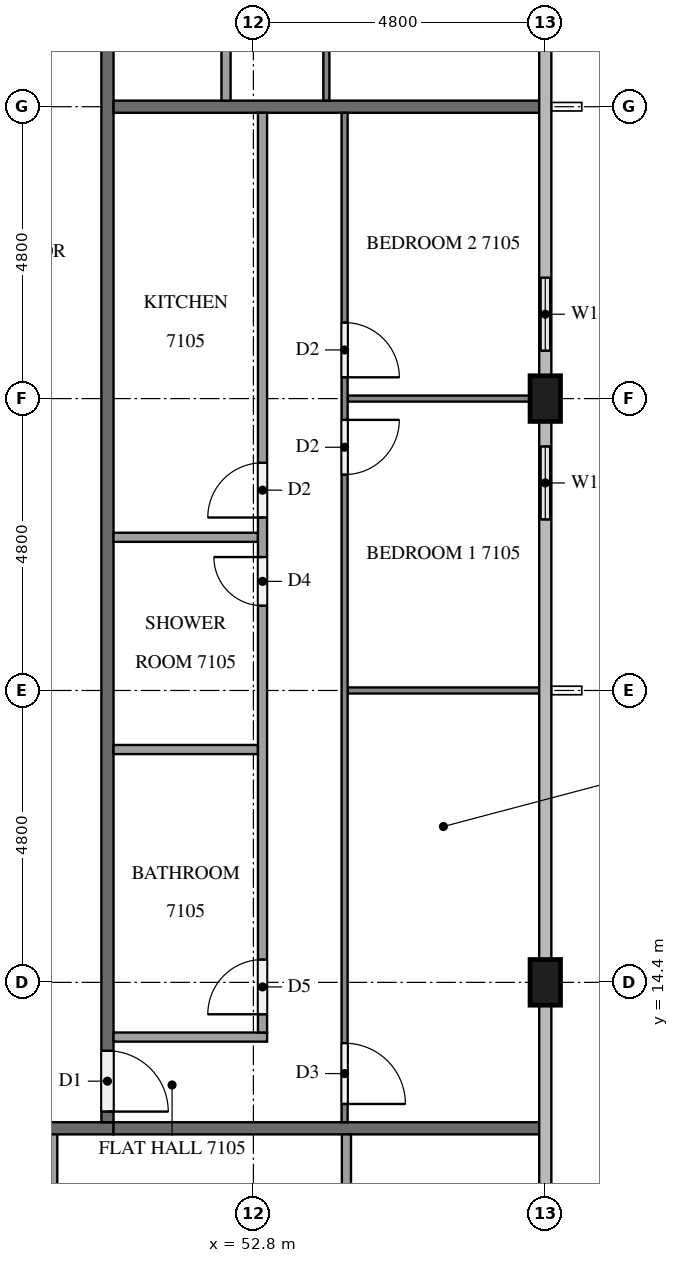
"""IFC4 building model, lengths in metres.
Left out: names, types, materials, properties, quantities, classifications, styles, units other than length and angle.
Written with IfcOpenShell. Run it as: python <this file> out.ifc"""

import sys

from ifc_helpers import new_model, si_unit, direction, frame, frame_2d, origin, origin_2d, place, context, subcontext, project, spatial, rectangle, extrude, element, fill, save


model = new_model("IFC4")
c1 = context("Model", 3, precision=1e-05, world=origin(), true_north=direction((0.0, 1.0)))
c2 = subcontext(c1, "Body", "Model", "MODEL_VIEW")
j1 = project(units=[si_unit("LENGTHUNIT", "METRE"), si_unit("PLANEANGLEUNIT", "RADIAN")], contexts=[c1])
p1 = place(None, origin())
s1 = spatial("IfcSite", under=j1, at=p1, CompositionType="ELEMENT")
p2 = place(p1, origin())
s2 = spatial("IfcBuilding", under=s1, at=p2, CompositionType="ELEMENT")
p3 = place(p2, frame((0.0, 0.0, 272.1)))
s3 = spatial("IfcBuildingStorey", under=s2, at=p3, CompositionType="ELEMENT", Elevation=272.1)
for number, where, z_axis, x_axis in (
    (1, (57.6, 14.4, 0.0), (0.0, 0.0, 1.0), (0.0, 1.0, 0.0)),
    (2, (57.6, 24.0, 0.0), (0.0, 0.0, 1.0), (0.0, 1.0, 0.0)),
):
    element("IfcColumn", number, at=place(p3, frame(where, z_axis=z_axis, x_axis=x_axis)), inside=s3, PredefinedType="COLUMN", context=c2, shape_type="SweptSolid", body=[
        extrude(rectangle(XDim=0.75, YDim=0.5, at=origin_2d()), origin(), (0.0, 0.0, 1.0), 3.2),
    ])
p4 = place(p3, frame((57.6, 21.6, 0.0), z_axis=(0.0, 0.0, 1.0), x_axis=(0.0, 1.0, 0.0)))
e3 = element("IfcWall", 3, at=p4, inside=s3, PredefinedType="SOLIDWALL", context=c2, shape_type="SweptSolid", body=[
    extrude(rectangle(XDim=2.025, YDim=0.15, at=frame_2d((1.012, 0.0))), origin(), (0.0, 0.0, 1.0), 3.2),
])
p5 = place(p4, frame((0.413, 0.0, 0.9)))
e4 = element("IfcOpeningElement", 4, at=p5, cuts=e3, PredefinedType="OPENING", context=c2, shape_type="SweptSolid", body=[
    extrude(rectangle(XDim=1.2, YDim=1.4, at=frame_2d((0.6, 0.7))), frame((0.0, 0.085, 0.0), z_axis=(0.0, -1.0, 0.0), x_axis=(1.0, 0.0, 0.0)), (0.0, 0.0, 1.0), 0.17),
])
p6 = place(p3, frame((57.6, 24.375, 0.0), z_axis=(0.0, 0.0, 1.0), x_axis=(0.0, 1.0, 0.0)))
e5 = element("IfcWall", 5, at=p6, inside=s3, PredefinedType="SOLIDWALL", context=c2, shape_type="SweptSolid", body=[
    extrude(rectangle(XDim=2.025, YDim=0.15, at=frame_2d((1.012, 0.0))), origin(), (0.0, 0.0, 1.0), 3.2),
])
p7 = place(p6, frame((0.413, 0.0, 0.9)))
e6 = element("IfcOpeningElement", 6, at=p7, cuts=e5, PredefinedType="OPENING", context=c2, shape_type="SweptSolid", body=[
    extrude(rectangle(XDim=1.2, YDim=1.4, at=frame_2d((0.6, 0.7))), frame((0.0, 0.085, 0.0), z_axis=(0.0, -1.0, 0.0), x_axis=(1.0, 0.0, 0.0)), (0.0, 0.0, 1.0), 0.17),
])
p8 = place(p3, frame((50.5, 12.0, 0.0), z_axis=(0.0, 0.0, 1.0), x_axis=(-1.0, 0.0, 0.0)))
e7 = element("IfcWall", 7, at=p8, inside=s3, PredefinedType="PARTITIONING", context=c2, shape_type="SweptSolid", body=[
    extrude(rectangle(XDim=38.6, YDim=0.2, at=frame_2d((19.3, 0.0))), origin(), (0.0, 0.0, 1.0), 3.2),
])
p9 = place(p8, frame((31.525, 0.0, 0.0)))
e8 = element("IfcOpeningElement", 8, at=p9, cuts=e7, PredefinedType="OPENING", context=c2, shape_type="SweptSolid", body=[
    extrude(rectangle(XDim=1.1, YDim=2.1, at=frame_2d((0.55, 1.05))), frame((0.0, 0.11, 0.0), z_axis=(0.0, -1.0, 0.0), x_axis=(1.0, 0.0, 0.0)), (0.0, 0.0, 1.0), 0.22),
])
p10 = place(p8, frame((19.575, 0.0, 0.0)))
e9 = element("IfcOpeningElement", 9, at=p10, cuts=e7, PredefinedType="OPENING", context=c2, shape_type="SweptSolid", body=[
    extrude(rectangle(XDim=1.0, YDim=2.1, at=frame_2d((0.5, 1.05))), frame((0.0, 0.11, 0.0), z_axis=(0.0, -1.0, 0.0), x_axis=(1.0, 0.0, 0.0)), (0.0, 0.0, 1.0), 0.22),
])
p11 = place(p8, frame((18.025, 0.0, 0.0)))
e10 = element("IfcOpeningElement", 10, at=p11, cuts=e7, PredefinedType="OPENING", context=c2, shape_type="SweptSolid", body=[
    extrude(rectangle(XDim=1.0, YDim=2.1, at=frame_2d((0.5, 1.05))), frame((0.0, 0.11, 0.0), z_axis=(0.0, -1.0, 0.0), x_axis=(1.0, 0.0, 0.0)), (0.0, 0.0, 1.0), 0.22),
])
p12 = place(p8, frame((1.225, 0.0, 0.0)))
e11 = element("IfcOpeningElement", 11, at=p12, cuts=e7, PredefinedType="OPENING", context=c2, shape_type="SweptSolid", body=[
    extrude(rectangle(XDim=1.0, YDim=2.1, at=frame_2d((0.5, 1.05))), frame((0.0, 0.11, 0.0), z_axis=(0.0, -1.0, 0.0), x_axis=(1.0, 0.0, 0.0)), (0.0, 0.0, 1.0), 0.22),
])
p13 = place(p3, frame((50.4, 40.7, 0.0), z_axis=(0.0, 0.0, 1.0), x_axis=(0.0, -1.0, 0.0)))
e12 = element("IfcWall", 12, at=p13, inside=s3, PredefinedType="PARTITIONING", context=c2, shape_type="SweptSolid", body=[
    extrude(rectangle(XDim=28.6, YDim=0.2, at=frame_2d((14.3, 0.0))), origin(), (0.0, 0.0, 1.0), 3.2),
])
p14 = place(p13, frame((27.425, 0.0, 0.0)))
e13 = element("IfcOpeningElement", 13, at=p14, cuts=e12, PredefinedType="OPENING", context=c2, shape_type="SweptSolid", body=[
    extrude(rectangle(XDim=1.0, YDim=2.1, at=frame_2d((0.5, 1.05))), frame((0.0, 0.11, 0.0), z_axis=(0.0, -1.0, 0.0), x_axis=(1.0, 0.0, 0.0)), (0.0, 0.0, 1.0), 0.22),
])
p15 = place(p13, frame((0.175, 0.0, 0.0)))
e14 = element("IfcOpeningElement", 14, at=p15, cuts=e12, PredefinedType="OPENING", context=c2, shape_type="SweptSolid", body=[
    extrude(rectangle(XDim=1.0, YDim=2.1, at=frame_2d((0.5, 1.05))), frame((0.0, 0.11, 0.0), z_axis=(0.0, -1.0, 0.0), x_axis=(1.0, 0.0, 0.0)), (0.0, 0.0, 1.0), 0.22),
])
for number, where, z_axis, x_axis in (
    (15, (50.5, 12.0, 0.0), (0.0, 0.0, 1.0), (1.0, 0.0, 0.0)),
    (16, (50.5, 28.8, 0.0), (0.0, 0.0, 1.0), (1.0, 0.0, 0.0)),
):
    element("IfcWall", number, at=place(p3, frame(where, z_axis=z_axis, x_axis=x_axis)), inside=s3, PredefinedType="PARTITIONING", context=c2, shape_type="SweptSolid", body=[
        extrude(rectangle(XDim=7.0, YDim=0.2, at=frame_2d((3.5, 0.0))), origin(), (0.0, 0.0, 1.0), 3.2),
    ])
p16 = place(p3, frame((54.33, 11.9, 0.0), z_axis=(0.0, 0.0, 1.0), x_axis=(0.0, -1.0, 0.0)))
e17 = element("IfcWall", 17, at=p16, inside=s3, PredefinedType="PARTITIONING", context=c2, shape_type="SweptSolid", body=[
    extrude(rectangle(XDim=2.975, YDim=0.15, at=frame_2d((1.487, 0.0))), origin(), (0.0, 0.0, 1.0), 3.2),
])
p17 = place(p3, frame((49.5, 11.9, 0.0), z_axis=(0.0, 0.0, 1.0), x_axis=(0.0, -1.0, 0.0)))
e18 = element("IfcWall", 18, at=p17, inside=s3, PredefinedType="PARTITIONING", context=c2, shape_type="SweptSolid", body=[
    extrude(rectangle(XDim=3.125, YDim=0.15, at=frame_2d((1.562, 0.0))), origin(), (0.0, 0.0, 1.0), 3.2),
])
p18 = place(p3, frame((54.35, 19.2, 0.0), z_axis=(0.0, 0.0, 1.0), x_axis=(1.0, 0.0, 0.0)))
e19 = element("IfcWall", 19, at=p18, inside=s3, PredefinedType="PARTITIONING", context=c2, shape_type="SweptSolid", body=[
    extrude(rectangle(XDim=3.15, YDim=0.1, at=frame_2d((1.575, 0.0))), origin(), (0.0, 0.0, 1.0), 3.2),
])
p19 = place(p3, frame((54.35, 24.0, 0.0), z_axis=(0.0, 0.0, 1.0), x_axis=(1.0, 0.0, 0.0)))
e20 = element("IfcWall", 20, at=p19, inside=s3, PredefinedType="PARTITIONING", context=c2, shape_type="SweptSolid", body=[
    extrude(rectangle(XDim=3.0, YDim=0.1, at=frame_2d((1.5, 0.0))), origin(), (0.0, 0.0, 1.0), 3.2),
])
p20 = place(p3, frame((54.3, 28.7, 0.0), z_axis=(0.0, 0.0, 1.0), x_axis=(0.0, -1.0, 0.0)))
e21 = element("IfcWall", 21, at=p20, inside=s3, PredefinedType="PARTITIONING", context=c2, shape_type="SweptSolid", body=[
    extrude(rectangle(XDim=16.6, YDim=0.1, at=frame_2d((8.3, 0.0))), origin(), (0.0, 0.0, 1.0), 3.2),
])
p21 = place(p20, frame((15.3, 0.0, 0.0)))
e22 = element("IfcOpeningElement", 22, at=p21, cuts=e21, PredefinedType="OPENING", context=c2, shape_type="SweptSolid", body=[
    extrude(rectangle(XDim=1.0, YDim=2.1, at=frame_2d((0.5, 1.05))), frame((0.0, 0.06, 0.0), z_axis=(0.0, -1.0, 0.0), x_axis=(1.0, 0.0, 0.0)), (0.0, 0.0, 1.0), 0.12),
])
p22 = place(p20, frame((5.05, 0.0, 0.0)))
e23 = element("IfcOpeningElement", 23, at=p22, cuts=e21, PredefinedType="OPENING", context=c2, shape_type="SweptSolid", body=[
    extrude(rectangle(XDim=0.9, YDim=2.1, at=frame_2d((0.45, 1.05))), frame((0.0, 0.06, 0.0), z_axis=(0.0, -1.0, 0.0), x_axis=(1.0, 0.0, 0.0)), (0.0, 0.0, 1.0), 0.12),
])
p23 = place(p20, frame((3.45, 0.0, 0.0)))
e24 = element("IfcOpeningElement", 24, at=p23, cuts=e21, PredefinedType="OPENING", context=c2, shape_type="SweptSolid", body=[
    extrude(rectangle(XDim=0.9, YDim=2.1, at=frame_2d((0.45, 1.05))), frame((0.0, 0.06, 0.0), z_axis=(0.0, -1.0, 0.0), x_axis=(1.0, 0.0, 0.0)), (0.0, 0.0, 1.0), 0.12),
])
for number, where, z_axis, x_axis in (
    (25, (50.5, 18.229, 0.0), (0.0, 0.0, 1.0), (1.0, 0.0, 0.0)),
    (26, (50.5, 21.719, 0.0), (0.0, 0.0, 1.0), (1.0, 0.0, 0.0)),
):
    element("IfcWall", number, at=place(p3, frame(where, z_axis=z_axis, x_axis=x_axis)), inside=s3, PredefinedType="PARTITIONING", context=c2, shape_type="SweptSolid", body=[
        extrude(rectangle(XDim=2.375, YDim=0.15, at=frame_2d((1.188, 0.0))), origin(), (0.0, 0.0, 1.0), 3.2),
    ])
p24 = place(p3, frame((50.5, 13.5, 0.0), z_axis=(0.0, 0.0, 1.0), x_axis=(1.0, 0.0, 0.0)))
e27 = element("IfcWall", 27, at=p24, inside=s3, PredefinedType="PARTITIONING", context=c2, shape_type="SweptSolid", body=[
    extrude(rectangle(XDim=2.525, YDim=0.15, at=frame_2d((1.262, 0.0))), origin(), (0.0, 0.0, 1.0), 3.2),
])
p25 = place(p3, frame((52.95, 13.575, 0.0), z_axis=(0.0, 0.0, 1.0), x_axis=(0.0, 1.0, 0.0)))
e28 = element("IfcWall", 28, at=p25, inside=s3, PredefinedType="PARTITIONING", context=c2, shape_type="SweptSolid", body=[
    extrude(rectangle(XDim=15.125, YDim=0.15, at=frame_2d((7.562, 0.0))), origin(), (0.0, 0.0, 1.0), 3.2),
])
p26 = place(p25, frame((0.3, 0.0, 0.0)))
e29 = element("IfcOpeningElement", 29, at=p26, cuts=e28, PredefinedType="OPENING", context=c2, shape_type="SweptSolid", body=[
    extrude(rectangle(XDim=0.9, YDim=2.1, at=frame_2d((0.45, 1.05))), frame((0.0, 0.085, 0.0), z_axis=(0.0, -1.0, 0.0), x_axis=(1.0, 0.0, 0.0)), (0.0, 0.0, 1.0), 0.17),
])
p27 = place(p25, frame((7.019, 0.0, 0.0)))
e30 = element("IfcOpeningElement", 30, at=p27, cuts=e28, PredefinedType="OPENING", context=c2, shape_type="SweptSolid", body=[
    extrude(rectangle(XDim=0.8, YDim=2.1, at=frame_2d((0.4, 1.05))), frame((0.0, 0.085, 0.0), z_axis=(0.0, -1.0, 0.0), x_axis=(1.0, 0.0, 0.0)), (0.0, 0.0, 1.0), 0.17),
])
p28 = place(p25, frame((8.469, 0.0, 0.0)))
e31 = element("IfcOpeningElement", 31, at=p28, cuts=e28, PredefinedType="OPENING", context=c2, shape_type="SweptSolid", body=[
    extrude(rectangle(XDim=0.9, YDim=2.1, at=frame_2d((0.45, 1.05))), frame((0.0, 0.085, 0.0), z_axis=(0.0, -1.0, 0.0), x_axis=(1.0, 0.0, 0.0)), (0.0, 0.0, 1.0), 0.17),
])
p29 = place(p3, frame((54.0, 40.7, 0.0), z_axis=(0.0, 0.0, 1.0), x_axis=(0.0, -1.0, 0.0)))
e32 = element("IfcWall", 32, at=p29, inside=s3, PredefinedType="PARTITIONING", context=c2, shape_type="SweptSolid", body=[
    extrude(rectangle(XDim=11.8, YDim=0.1, at=frame_2d((5.9, 0.0))), origin(), (0.0, 0.0, 1.0), 3.2),
])
p30 = place(p29, frame((5.75, 0.0, 0.0)))
e33 = element("IfcOpeningElement", 33, at=p30, cuts=e32, PredefinedType="OPENING", context=c2, shape_type="SweptSolid", body=[
    extrude(rectangle(XDim=1.0, YDim=2.1, at=frame_2d((0.5, 1.05))), frame((0.0, 0.06, 0.0), z_axis=(0.0, -1.0, 0.0), x_axis=(1.0, 0.0, 0.0)), (0.0, 0.0, 1.0), 0.12),
])
p31 = place(p29, frame((7.45, 0.0, 0.0)))
e34 = element("IfcOpeningElement", 34, at=p31, cuts=e32, PredefinedType="OPENING", context=c2, shape_type="SweptSolid", body=[
    extrude(rectangle(XDim=0.9, YDim=2.1, at=frame_2d((0.45, 1.05))), frame((0.0, 0.06, 0.0), z_axis=(0.0, -1.0, 0.0), x_axis=(1.0, 0.0, 0.0)), (0.0, 0.0, 1.0), 0.12),
])
p32 = place(p3, frame((52.35, 28.9, 0.0), z_axis=(0.0, 0.0, 1.0), x_axis=(0.0, 1.0, 0.0)))
e35 = element("IfcWall", 35, at=p32, inside=s3, PredefinedType="PARTITIONING", context=c2, shape_type="SweptSolid", body=[
    extrude(rectangle(XDim=10.325, YDim=0.15, at=frame_2d((5.163, 0.0))), origin(), (0.0, 0.0, 1.0), 3.2),
])
p33 = place(p32, frame((6.52, 0.0, 0.0)))
e36 = element("IfcOpeningElement", 36, at=p33, cuts=e35, PredefinedType="OPENING", context=c2, shape_type="SweptSolid", body=[
    extrude(rectangle(XDim=0.8, YDim=2.1, at=frame_2d((0.4, 1.05))), frame((0.0, 0.085, 0.0), z_axis=(0.0, -1.0, 0.0), x_axis=(1.0, 0.0, 0.0)), (0.0, 0.0, 1.0), 0.17),
])
p34 = place(p32, frame((4.97, 0.0, 0.0)))
e37 = element("IfcOpeningElement", 37, at=p34, cuts=e35, PredefinedType="OPENING", context=c2, shape_type="SweptSolid", body=[
    extrude(rectangle(XDim=0.9, YDim=2.1, at=frame_2d((0.45, 1.05))), frame((0.0, 0.085, 0.0), z_axis=(0.0, -1.0, 0.0), x_axis=(1.0, 0.0, 0.0)), (0.0, 0.0, 1.0), 0.17),
])
p35 = place(p5, origin())
e38 = element("IfcWindow", 38, at=p35, inside=s3, PartitioningType="SINGLE_PANEL", PredefinedType="WINDOW", context=c2, shape_type="SweptSolid", body=[
    extrude(rectangle(XDim=1.2, YDim=1.4, at=frame_2d((0.6, 0.7))), frame((0.0, 0.03, 0.0), z_axis=(0.0, -1.0, 0.0), x_axis=(1.0, 0.0, 0.0)), (0.0, 0.0, 1.0), 0.06),
])
fill(e4, e38)
p36 = place(p7, origin())
e39 = element("IfcWindow", 39, at=p36, inside=s3, PartitioningType="SINGLE_PANEL", PredefinedType="WINDOW", context=c2, shape_type="SweptSolid", body=[
    extrude(rectangle(XDim=1.2, YDim=1.4, at=frame_2d((0.6, 0.7))), frame((0.0, 0.03, 0.0), z_axis=(0.0, -1.0, 0.0), x_axis=(1.0, 0.0, 0.0)), (0.0, 0.0, 1.0), 0.06),
])
fill(e6, e39)
p37 = place(p14, origin())
e40 = element("IfcDoor", 40, at=p37, inside=s3, OperationType="SINGLE_SWING_RIGHT", PredefinedType="DOOR", context=c2, shape_type="SweptSolid", body=[
    extrude(rectangle(XDim=1.0, YDim=2.1, at=frame_2d((0.5, 1.05))), frame((0.0, 0.025, 0.0), z_axis=(0.0, -1.0, 0.0), x_axis=(1.0, 0.0, 0.0)), (0.0, 0.0, 1.0), 0.05),
])
fill(e13, e40)
p38 = place(p21, origin())
e41 = element("IfcDoor", 41, at=p38, inside=s3, OperationType="SINGLE_SWING_RIGHT", PredefinedType="DOOR", context=c2, shape_type="SweptSolid", body=[
    extrude(rectangle(XDim=1.0, YDim=2.1, at=frame_2d((0.5, 1.05))), frame((0.0, 0.025, 0.0), z_axis=(0.0, -1.0, 0.0), x_axis=(1.0, 0.0, 0.0)), (0.0, 0.0, 1.0), 0.05),
])
fill(e22, e41)
p39 = place(p22, origin())
e42 = element("IfcDoor", 42, at=p39, inside=s3, OperationType="SINGLE_SWING_LEFT", PredefinedType="DOOR", context=c2, shape_type="SweptSolid", body=[
    extrude(rectangle(XDim=0.9, YDim=2.1, at=frame_2d((0.45, 1.05))), frame((0.0, 0.025, 0.0), z_axis=(0.0, -1.0, 0.0), x_axis=(1.0, 0.0, 0.0)), (0.0, 0.0, 1.0), 0.05),
])
fill(e23, e42)
p40 = place(p23, origin())
e43 = element("IfcDoor", 43, at=p40, inside=s3, OperationType="SINGLE_SWING_RIGHT", PredefinedType="DOOR", context=c2, shape_type="SweptSolid", body=[
    extrude(rectangle(XDim=0.9, YDim=2.1, at=frame_2d((0.45, 1.05))), frame((0.0, 0.025, 0.0), z_axis=(0.0, -1.0, 0.0), x_axis=(1.0, 0.0, 0.0)), (0.0, 0.0, 1.0), 0.05),
])
fill(e24, e43)
p41 = place(p26, origin())
e44 = element("IfcDoor", 44, at=p41, inside=s3, OperationType="SINGLE_SWING_LEFT", PredefinedType="DOOR", context=c2, shape_type="SweptSolid", body=[
    extrude(rectangle(XDim=0.9, YDim=2.1, at=frame_2d((0.45, 1.05))), frame((0.0, 0.025, 0.0), z_axis=(0.0, -1.0, 0.0), x_axis=(1.0, 0.0, 0.0)), (0.0, 0.0, 1.0), 0.05),
])
fill(e29, e44)
p42 = place(p27, origin())
e45 = element("IfcDoor", 45, at=p42, inside=s3, OperationType="SINGLE_SWING_RIGHT", PredefinedType="DOOR", context=c2, shape_type="SweptSolid", body=[
    extrude(rectangle(XDim=0.8, YDim=2.1, at=frame_2d((0.4, 1.05))), frame((0.0, 0.025, 0.0), z_axis=(0.0, -1.0, 0.0), x_axis=(1.0, 0.0, 0.0)), (0.0, 0.0, 1.0), 0.05),
])
fill(e30, e45)
p43 = place(p28, origin())
e46 = element("IfcDoor", 46, at=p43, inside=s3, OperationType="SINGLE_SWING_LEFT", PredefinedType="DOOR", context=c2, shape_type="SweptSolid", body=[
    extrude(rectangle(XDim=0.9, YDim=2.1, at=frame_2d((0.45, 1.05))), frame((0.0, 0.025, 0.0), z_axis=(0.0, -1.0, 0.0), x_axis=(1.0, 0.0, 0.0)), (0.0, 0.0, 1.0), 0.05),
])
fill(e31, e46)
save(model, sys.argv[1])
